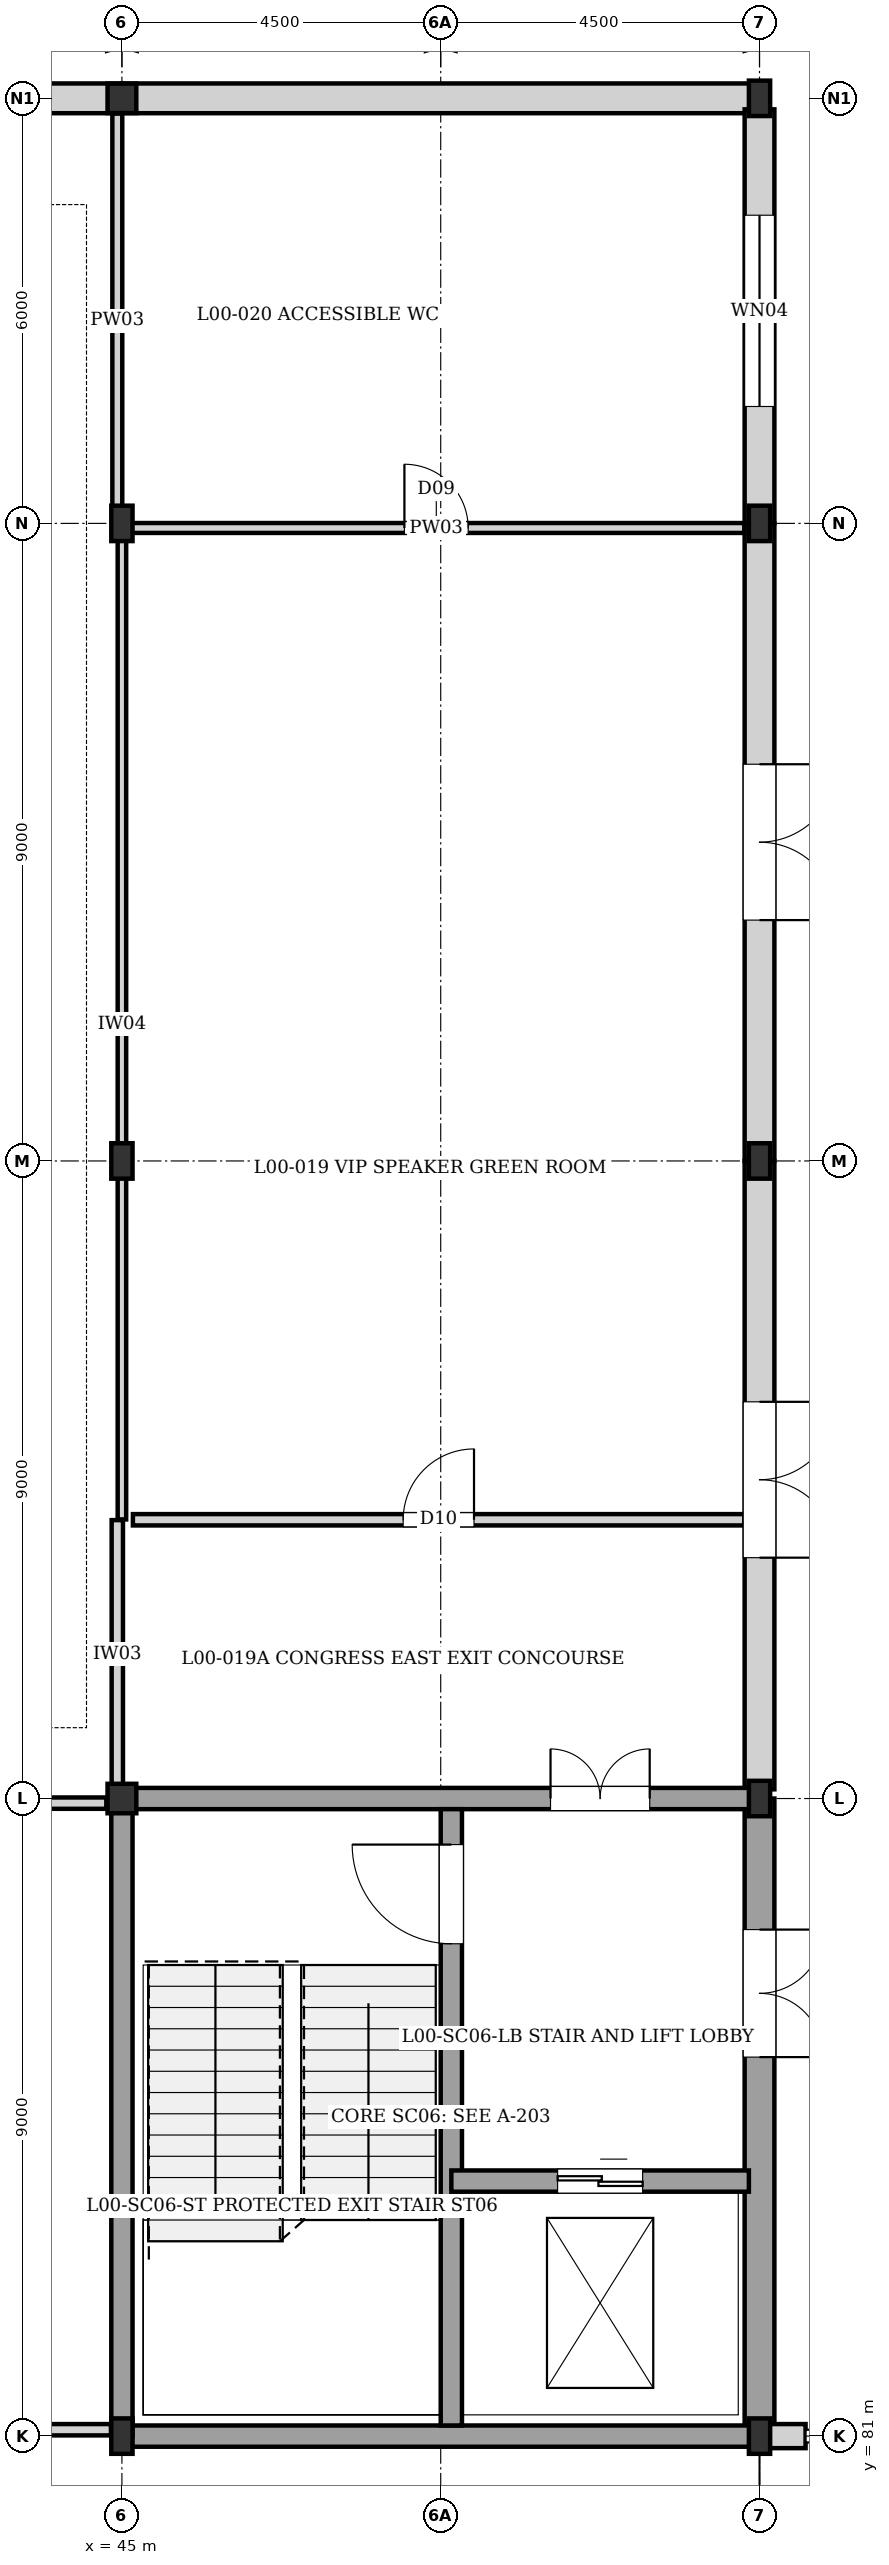
"""IFC4 building model, lengths in metres.
Left out: names, types, materials, properties, quantities, classifications, styles, units other than length and angle.
Written with IfcOpenShell. Run it as: python <this file> out.ifc"""

import sys

from ifc_helpers import new_model, si_unit, direction, frame, frame_2d, origin, origin_2d, place, context, subcontext, project, spatial, rectangle, i_section, extrude, element, fill, save


model = new_model("IFC4")
c1 = context("Model", 3, precision=1e-05, world=origin(), true_north=direction((0.0, 1.0)))
c2 = subcontext(c1, "Body", "Model", "MODEL_VIEW")
j1 = project(units=[si_unit("LENGTHUNIT", "METRE"), si_unit("PLANEANGLEUNIT", "RADIAN")], contexts=[c1])
p1 = place(None, origin())
s1 = spatial("IfcSite", under=j1, at=p1, CompositionType="ELEMENT")
p2 = place(p1, origin())
s2 = spatial("IfcBuilding", under=s1, at=p2, CompositionType="ELEMENT")
p3 = place(p2, origin())
s3 = spatial("IfcBuildingStorey", under=s2, at=p3, CompositionType="ELEMENT", Elevation=0.0)
p4 = place(p3, frame((45.0, 81.0, 0.0), z_axis=(0.0, 0.0, 1.0), x_axis=(1.0, 0.0, 0.0)))
e1 = element("IfcColumn", 1, at=p4, inside=s3, PredefinedType="COLUMN", context=c2, shape_type="SweptSolid", body=[
    extrude(i_section(OverallWidth=0.3, OverallDepth=0.5, WebThickness=0.014, FlangeThickness=0.028, at=origin_2d()), origin(), (0.0, 0.0, 1.0), 4.32),
])
p5 = place(p3, frame((45.0, 90.0, 0.0), z_axis=(0.0, 0.0, 1.0), x_axis=(1.0, 0.0, 0.0)))
e2 = element("IfcColumn", 2, at=p5, inside=s3, PredefinedType="COLUMN", context=c2, shape_type="SweptSolid", body=[
    extrude(i_section(OverallWidth=0.406, OverallDepth=0.416, WebThickness=0.022, FlangeThickness=0.038, at=origin_2d()), origin(), (0.0, 0.0, 1.0), 4.32),
])
for number, where, z_axis, x_axis in (
    (3, (45.0, 99.0, 0.0), (0.0, 0.0, 1.0), (1.0, 0.0, 0.0)),
    (4, (45.0, 108.0, 0.0), (0.0, 0.0, 1.0), (1.0, 0.0, 0.0)),
):
    element("IfcColumn", number, at=place(p3, frame(where, z_axis=z_axis, x_axis=x_axis)), inside=s3, PredefinedType="COLUMN", context=c2, shape_type="SweptSolid", body=[
        extrude(i_section(OverallWidth=0.3, OverallDepth=0.5, WebThickness=0.014, FlangeThickness=0.028, at=origin_2d()), origin(), (0.0, 0.0, 1.0), 4.32),
    ])
p6 = place(p3, frame((45.0, 114.0, 0.0), z_axis=(0.0, 0.0, 1.0), x_axis=(1.0, 0.0, 0.0)))
e5 = element("IfcColumn", 5, at=p6, inside=s3, PredefinedType="COLUMN", context=c2, shape_type="SweptSolid", body=[
    extrude(i_section(OverallWidth=0.406, OverallDepth=0.416, WebThickness=0.022, FlangeThickness=0.038, at=origin_2d()), origin(), (0.0, 0.0, 1.0), 4.32),
])
for number, where, z_axis, x_axis in (
    (6, (54.0, 81.0, 0.0), (0.0, 0.0, 1.0), (1.0, 0.0, 0.0)),
    (7, (54.0, 90.0, 0.0), (0.0, 0.0, 1.0), (1.0, 0.0, 0.0)),
    (8, (54.0, 99.0, 0.0), (0.0, 0.0, 1.0), (1.0, 0.0, 0.0)),
    (9, (54.0, 108.0, 0.0), (0.0, 0.0, 1.0), (1.0, 0.0, 0.0)),
    (10, (54.0, 114.0, 0.0), (0.0, 0.0, 1.0), (1.0, 0.0, 0.0)),
):
    element("IfcColumn", number, at=place(p3, frame(where, z_axis=z_axis, x_axis=x_axis)), inside=s3, PredefinedType="COLUMN", context=c2, shape_type="SweptSolid", body=[
        extrude(i_section(OverallWidth=0.3, OverallDepth=0.5, WebThickness=0.014, FlangeThickness=0.028, at=origin_2d()), origin(), (0.0, 0.0, 1.0), 4.32),
    ])
p7 = place(p3, frame((36.0, 114.0, 0.0), z_axis=(0.0, 0.0, 1.0), x_axis=(1.0, 0.0, 0.0)))
e11 = element("IfcWall", 11, at=p7, inside=s3, PredefinedType="SOLIDWALL", context=c2, shape_type="SweptSolid", body=[
    extrude(rectangle(XDim=9.0, YDim=0.42, at=frame_2d((4.5, 0.0))), origin(), (0.0, 0.0, 1.0), 3.695),
])
p8 = place(p7, frame((2.7, 0.0, 0.0)))
e12 = element("IfcOpeningElement", 12, at=p8, cuts=e11, PredefinedType="OPENING", context=c2, shape_type="SweptSolid", body=[
    extrude(rectangle(XDim=3.6, YDim=3.1, at=frame_2d((1.8, 1.55))), frame((0.0, 0.22, 0.0), z_axis=(0.0, -1.0, 0.0), x_axis=(1.0, 0.0, 0.0)), (0.0, 0.0, 1.0), 0.44),
])
p9 = place(p3, frame((45.0, 114.0, 0.0), z_axis=(0.0, 0.0, 1.0), x_axis=(1.0, 0.0, 0.0)))
e13 = element("IfcWall", 13, at=p9, inside=s3, PredefinedType="SOLIDWALL", context=c2, shape_type="SweptSolid", body=[
    extrude(rectangle(XDim=9.0, YDim=0.42, at=frame_2d((4.5, 0.0))), origin(), (0.0, 0.0, 1.0), 3.655),
])
p10 = place(p3, frame((54.0, 113.845, 0.0), z_axis=(0.0, 0.0, 1.0), x_axis=(0.0, -1.0, 0.0)))
e14 = element("IfcWall", 14, at=p10, inside=s3, PredefinedType="SOLIDWALL", context=c2, shape_type="SweptSolid", body=[
    extrude(rectangle(XDim=5.845, YDim=0.42, at=frame_2d((2.922, 0.0))), origin(), (0.0, 0.0, 1.0), 3.655),
])
p11 = place(p10, frame((1.495, 0.0, 0.4)))
e15 = element("IfcOpeningElement", 15, at=p11, cuts=e14, PredefinedType="OPENING", context=c2, shape_type="SweptSolid", body=[
    extrude(rectangle(XDim=2.7, YDim=1.95, at=frame_2d((1.35, 0.975))), frame((0.0, 0.22, 0.0), z_axis=(0.0, -1.0, 0.0), x_axis=(1.0, 0.0, 0.0)), (0.0, 0.0, 1.0), 0.44),
])
p12 = place(p3, frame((54.0, 108.0, 0.0), z_axis=(0.0, 0.0, 1.0), x_axis=(0.0, -1.0, 0.0)))
e16 = element("IfcWall", 16, at=p12, inside=s3, PredefinedType="SOLIDWALL", context=c2, shape_type="SweptSolid", body=[
    extrude(rectangle(XDim=9.0, YDim=0.42, at=frame_2d((4.5, 0.0))), origin(), (0.0, 0.0, 1.0), 3.695),
])
p13 = place(p12, frame((3.4, 0.0, 0.0)))
e17 = element("IfcOpeningElement", 17, at=p13, cuts=e16, PredefinedType="OPENING", context=c2, shape_type="SweptSolid", body=[
    extrude(rectangle(XDim=2.2, YDim=2.5, at=frame_2d((1.1, 1.25))), frame((0.0, 0.22, 0.0), z_axis=(0.0, -1.0, 0.0), x_axis=(1.0, 0.0, 0.0)), (0.0, 0.0, 1.0), 0.44),
])
p14 = place(p3, frame((54.0, 99.0, 0.0), z_axis=(0.0, 0.0, 1.0), x_axis=(0.0, -1.0, 0.0)))
e18 = element("IfcWall", 18, at=p14, inside=s3, PredefinedType="SOLIDWALL", context=c2, shape_type="SweptSolid", body=[
    extrude(rectangle(XDim=8.87, YDim=0.42, at=frame_2d((4.435, 0.0))), origin(), (0.0, 0.0, 1.0), 3.755),
])
p15 = place(p14, frame((3.4, 0.0, 0.0)))
e19 = element("IfcOpeningElement", 19, at=p15, cuts=e18, PredefinedType="OPENING", context=c2, shape_type="SweptSolid", body=[
    extrude(rectangle(XDim=2.2, YDim=2.5, at=frame_2d((1.1, 1.25))), frame((0.0, 0.22, 0.0), z_axis=(0.0, -1.0, 0.0), x_axis=(1.0, 0.0, 0.0)), (0.0, 0.0, 1.0), 0.44),
])
p16 = place(p3, frame((54.0, 90.0, 0.0), z_axis=(0.0, 0.0, 1.0), x_axis=(0.0, -1.0, 0.0)))
e20 = element("IfcWall", 20, at=p16, inside=s3, PredefinedType="SOLIDWALL", context=c2, shape_type="SweptSolid", body=[
    extrude(rectangle(XDim=9.0, YDim=0.42, at=frame_2d((4.5, 0.0))), origin(), (0.0, 0.0, 1.0), 4.055),
])
p17 = place(p16, frame((1.85, 0.0, 0.0)))
e21 = element("IfcOpeningElement", 21, at=p17, cuts=e20, PredefinedType="OPENING", context=c2, shape_type="SweptSolid", body=[
    extrude(rectangle(XDim=1.8, YDim=2.2, at=frame_2d((0.9, 1.1))), frame((0.0, 0.22, 0.0), z_axis=(0.0, -1.0, 0.0), x_axis=(1.0, 0.0, 0.0)), (0.0, 0.0, 1.0), 0.44),
])
p18 = place(p3, frame((54.13, 81.0, 0.0), z_axis=(0.0, 0.0, 1.0), x_axis=(1.0, 0.0, 0.0)))
e22 = element("IfcWall", 22, at=p18, inside=s3, PredefinedType="SOLIDWALL", context=c2, shape_type="SweptSolid", body=[
    extrude(rectangle(XDim=0.52, YDim=0.34, at=frame_2d((0.26, 0.0))), origin(), (0.0, 0.0, 1.0), 3.825),
])
p19 = place(p3, frame((45.0, 81.0, 0.0), z_axis=(0.0, 0.0, 1.0), x_axis=(1.0, 0.0, 0.0)))
e23 = element("IfcWall", 23, at=p19, inside=s3, PredefinedType="SHEAR", context=c2, shape_type="SweptSolid", body=[
    extrude(rectangle(XDim=9.0, YDim=0.3, at=frame_2d((4.5, 0.0))), origin(), (0.0, 0.0, 1.0), 4.055),
])
p20 = place(p3, frame((45.0, 90.0, 0.0), z_axis=(0.0, 0.0, 1.0), x_axis=(1.0, 0.0, 0.0)))
e24 = element("IfcWall", 24, at=p20, inside=s3, PredefinedType="SHEAR", context=c2, shape_type="SweptSolid", body=[
    extrude(rectangle(XDim=9.0, YDim=0.3, at=frame_2d((4.5, 0.0))), origin(), (0.0, 0.0, 1.0), 4.055),
])
p21 = place(p20, frame((6.05, 0.0, 0.0)))
e25 = element("IfcOpeningElement", 25, at=p21, cuts=e24, PredefinedType="OPENING", context=c2, shape_type="SweptSolid", body=[
    extrude(rectangle(XDim=1.4, YDim=2.02, at=frame_2d((0.7, 1.01))), frame((0.0, 0.16, 0.0), z_axis=(0.0, -1.0, 0.0), x_axis=(1.0, 0.0, 0.0)), (0.0, 0.0, 1.0), 0.32),
])
p22 = place(p3, frame((45.0, 81.0, 0.0), z_axis=(0.0, 0.0, 1.0), x_axis=(0.0, 1.0, 0.0)))
e26 = element("IfcWall", 26, at=p22, inside=s3, PredefinedType="SHEAR", context=c2, shape_type="SweptSolid", body=[
    extrude(rectangle(XDim=9.0, YDim=0.3, at=frame_2d((4.5, 0.0))), origin(), (0.0, 0.0, 1.0), 4.055),
])
p23 = place(p3, frame((49.65, 81.15, 0.0), z_axis=(0.0, 0.0, 1.0), x_axis=(0.0, 1.0, 0.0)))
e27 = element("IfcWall", 27, at=p23, inside=s3, PredefinedType="SHEAR", context=c2, shape_type="SweptSolid", body=[
    extrude(rectangle(XDim=8.7, YDim=0.3, at=frame_2d((4.35, 0.0))), origin(), (0.0, 0.0, 1.0), 4.055),
])
p24 = place(p23, frame((6.8, 0.0, 0.0)))
e28 = element("IfcOpeningElement", 28, at=p24, cuts=e27, PredefinedType="OPENING", context=c2, shape_type="SweptSolid", body=[
    extrude(rectangle(XDim=1.4, YDim=2.02, at=frame_2d((0.7, 1.01))), frame((0.0, 0.16, 0.0), z_axis=(0.0, -1.0, 0.0), x_axis=(1.0, 0.0, 0.0)), (0.0, 0.0, 1.0), 0.32),
])
p25 = place(p3, frame((49.65, 84.6, 0.0), z_axis=(0.0, 0.0, 1.0), x_axis=(1.0, 0.0, 0.0)))
e29 = element("IfcWall", 29, at=p25, inside=s3, PredefinedType="SHEAR", context=c2, shape_type="SweptSolid", body=[
    extrude(rectangle(XDim=4.2, YDim=0.3, at=frame_2d((2.1, 0.0))), origin(), (0.0, 0.0, 1.0), 4.055),
])
p26 = place(p25, frame((1.5, 0.0, 0.0)))
e30 = element("IfcOpeningElement", 30, at=p26, cuts=e29, PredefinedType="OPENING", context=c2, shape_type="SweptSolid", body=[
    extrude(rectangle(XDim=1.2, YDim=2.2, at=frame_2d((0.6, 1.1))), frame((0.0, 0.16, 0.0), z_axis=(0.0, -1.0, 0.0), x_axis=(1.0, 0.0, 0.0)), (0.0, 0.0, 1.0), 0.32),
])
p27 = place(p3, frame((44.935, 90.155, 0.0), z_axis=(0.0, 0.0, 1.0), x_axis=(0.0, 1.0, 0.0)))
e31 = element("IfcWall", 31, at=p27, inside=s3, PredefinedType="PARTITIONING", context=c2, shape_type="SweptSolid", body=[
    extrude(rectangle(XDim=3.775, YDim=0.16, at=frame_2d((1.887, 0.0))), origin(), (0.0, 0.0, 1.0), 4.055),
])
p28 = place(p3, frame((45.0, 93.94, 0.0), z_axis=(0.0, 0.0, 1.0), x_axis=(0.0, 1.0, 0.0)))
e32 = element("IfcWall", 32, at=p28, inside=s3, PredefinedType="PARTITIONING", context=c2, shape_type="SweptSolid", body=[
    extrude(rectangle(XDim=13.99, YDim=0.12, at=frame_2d((6.995, 0.0))), origin(), (0.0, 0.0, 1.0), 4.055),
])
p29 = place(p3, frame((44.935, 107.94, 0.0), z_axis=(0.0, 0.0, 1.0), x_axis=(0.0, 1.0, 0.0)))
e33 = element("IfcWall", 33, at=p29, inside=s3, PredefinedType="PLUMBINGWALL", context=c2, shape_type="SweptSolid", body=[
    extrude(rectangle(XDim=5.845, YDim=0.14, at=frame_2d((2.922, 0.0))), origin(), (0.0, 0.0, 1.0), 4.055),
])
p30 = place(p3, frame((37.09, 89.935, 0.0), z_axis=(0.0, 0.0, 1.0), x_axis=(1.0, 0.0, 0.0)))
e34 = element("IfcWall", 34, at=p30, inside=s3, PredefinedType="PARTITIONING", context=c2, shape_type="SweptSolid", body=[
    extrude(rectangle(XDim=7.69, YDim=0.16, at=frame_2d((3.845, 0.0))), origin(), (0.0, 0.0, 1.0), 3.505),
])
p31 = place(p30, frame((2.845, 0.0, 0.0)))
e35 = element("IfcOpeningElement", 35, at=p31, cuts=e34, PredefinedType="OPENING", context=c2, shape_type="SweptSolid", body=[
    extrude(rectangle(XDim=2.0, YDim=2.35, at=frame_2d((1.0, 1.175))), frame((0.0, 0.09, 0.0), z_axis=(0.0, -1.0, 0.0), x_axis=(1.0, 0.0, 0.0)), (0.0, 0.0, 1.0), 0.18),
])
p32 = place(p3, frame((45.155, 93.935, 0.0), z_axis=(0.0, 0.0, 1.0), x_axis=(1.0, 0.0, 0.0)))
e36 = element("IfcWall", 36, at=p32, inside=s3, PredefinedType="PARTITIONING", context=c2, shape_type="SweptSolid", body=[
    extrude(rectangle(XDim=8.63, YDim=0.16, at=frame_2d((4.315, 0.0))), origin(), (0.0, 0.0, 1.0), 4.055),
])
p33 = place(p32, frame((3.815, 0.0, 0.0)))
e37 = element("IfcOpeningElement", 37, at=p33, cuts=e36, PredefinedType="OPENING", context=c2, shape_type="SweptSolid", body=[
    extrude(rectangle(XDim=1.0, YDim=2.1, at=frame_2d((0.5, 1.05))), frame((0.0, 0.09, 0.0), z_axis=(0.0, -1.0, 0.0), x_axis=(1.0, 0.0, 0.0)), (0.0, 0.0, 1.0), 0.18),
])
p34 = place(p3, frame((45.09, 107.935, 0.0), z_axis=(0.0, 0.0, 1.0), x_axis=(1.0, 0.0, 0.0)))
e38 = element("IfcWall", 38, at=p34, inside=s3, PredefinedType="PLUMBINGWALL", context=c2, shape_type="SweptSolid", body=[
    extrude(rectangle(XDim=8.695, YDim=0.14, at=frame_2d((4.347, 0.0))), origin(), (0.0, 0.0, 1.0), 4.055),
])
p35 = place(p34, frame((3.897, 0.0, 0.0)))
e39 = element("IfcOpeningElement", 39, at=p35, cuts=e38, PredefinedType="OPENING", context=c2, shape_type="SweptSolid", body=[
    extrude(rectangle(XDim=0.9, YDim=2.1, at=frame_2d((0.45, 1.05))), frame((0.0, 0.08, 0.0), z_axis=(0.0, -1.0, 0.0), x_axis=(1.0, 0.0, 0.0)), (0.0, 0.0, 1.0), 0.16),
])
p36 = place(p3, frame((35.98, 81.09, 0.0), z_axis=(0.0, 0.0, 1.0), x_axis=(1.0, 0.0, 0.0)))
e40 = element("IfcWall", 40, at=p36, inside=s3, PredefinedType="PARTITIONING", context=c2, shape_type="SweptSolid", body=[
    extrude(rectangle(XDim=8.865, YDim=0.16, at=frame_2d((4.433, 0.0))), origin(), (0.0, 0.0, 1.0), 3.695),
])
p37 = place(p11, origin())
e41 = element("IfcWindow", 41, at=p37, inside=s3, PartitioningType="SINGLE_PANEL", PredefinedType="WINDOW", context=c2, shape_type="SweptSolid", body=[
    extrude(rectangle(XDim=2.7, YDim=1.95, at=frame_2d((1.35, 0.975))), frame((0.0, 0.03, 0.0), z_axis=(0.0, -1.0, 0.0), x_axis=(1.0, 0.0, 0.0)), (0.0, 0.0, 1.0), 0.06),
])
fill(e15, e41)
p38 = place(p13, origin())
e42 = element("IfcDoor", 42, at=p38, inside=s3, OperationType="DOUBLE_DOOR_SINGLE_SWING", PredefinedType="DOOR", context=c2, shape_type="SweptSolid", body=[
    extrude(rectangle(XDim=2.2, YDim=2.5, at=frame_2d((1.1, 1.25))), frame((0.0, 0.025, 0.0), z_axis=(0.0, -1.0, 0.0), x_axis=(1.0, 0.0, 0.0)), (0.0, 0.0, 1.0), 0.05),
])
fill(e17, e42)
p39 = place(p15, origin())
e43 = element("IfcDoor", 43, at=p39, inside=s3, OperationType="DOUBLE_DOOR_SINGLE_SWING", PredefinedType="DOOR", context=c2, shape_type="SweptSolid", body=[
    extrude(rectangle(XDim=2.2, YDim=2.5, at=frame_2d((1.1, 1.25))), frame((0.0, 0.025, 0.0), z_axis=(0.0, -1.0, 0.0), x_axis=(1.0, 0.0, 0.0)), (0.0, 0.0, 1.0), 0.05),
])
fill(e19, e43)
p40 = place(p17, origin())
e44 = element("IfcDoor", 44, at=p40, inside=s3, OperationType="DOUBLE_DOOR_SINGLE_SWING", PredefinedType="DOOR", context=c2, shape_type="SweptSolid", body=[
    extrude(rectangle(XDim=1.8, YDim=2.2, at=frame_2d((0.9, 1.1))), frame((0.0, 0.025, 0.0), z_axis=(0.0, -1.0, 0.0), x_axis=(1.0, 0.0, 0.0)), (0.0, 0.0, 1.0), 0.05),
])
fill(e21, e44)
p41 = place(p21, origin())
e45 = element("IfcDoor", 45, at=p41, inside=s3, OperationType="DOUBLE_DOOR_SINGLE_SWING", PredefinedType="DOOR", context=c2, shape_type="SweptSolid", body=[
    extrude(rectangle(XDim=1.4, YDim=2.02, at=frame_2d((0.7, 1.01))), frame((0.0, 0.025, 0.0), z_axis=(0.0, -1.0, 0.0), x_axis=(1.0, 0.0, 0.0)), (0.0, 0.0, 1.0), 0.05),
])
fill(e25, e45)
p42 = place(p24, origin())
e46 = element("IfcDoor", 46, at=p42, inside=s3, OperationType="SINGLE_SWING_RIGHT", PredefinedType="DOOR", context=c2, shape_type="SweptSolid", body=[
    extrude(rectangle(XDim=1.4, YDim=2.02, at=frame_2d((0.7, 1.01))), frame((0.0, 0.025, 0.0), z_axis=(0.0, -1.0, 0.0), x_axis=(1.0, 0.0, 0.0)), (0.0, 0.0, 1.0), 0.05),
])
fill(e28, e46)
p43 = place(p26, origin())
e47 = element("IfcDoor", 47, at=p43, inside=s3, OperationType="DOUBLE_DOOR_SLIDING", PredefinedType="DOOR", context=c2, shape_type="SweptSolid", body=[
    extrude(rectangle(XDim=1.2, YDim=2.2, at=frame_2d((0.6, 1.1))), frame((0.0, 0.025, 0.0), z_axis=(0.0, -1.0, 0.0), x_axis=(1.0, 0.0, 0.0)), (0.0, 0.0, 1.0), 0.05),
])
fill(e30, e47)
p44 = place(p33, origin())
e48 = element("IfcDoor", 48, at=p44, inside=s3, OperationType="SINGLE_SWING_RIGHT", PredefinedType="DOOR", context=c2, shape_type="SweptSolid", body=[
    extrude(rectangle(XDim=1.0, YDim=2.1, at=frame_2d((0.5, 1.05))), frame((0.0, 0.025, 0.0), z_axis=(0.0, -1.0, 0.0), x_axis=(1.0, 0.0, 0.0)), (0.0, 0.0, 1.0), 0.05),
])
fill(e37, e48)
p45 = place(p35, origin())
e49 = element("IfcDoor", 49, at=p45, inside=s3, OperationType="SINGLE_SWING_LEFT", PredefinedType="DOOR", context=c2, shape_type="SweptSolid", body=[
    extrude(rectangle(XDim=0.9, YDim=2.1, at=frame_2d((0.45, 1.05))), frame((0.0, 0.025, 0.0), z_axis=(0.0, -1.0, 0.0), x_axis=(1.0, 0.0, 0.0)), (0.0, 0.0, 1.0), 0.05),
])
fill(e39, e49)
save(model, sys.argv[1])
